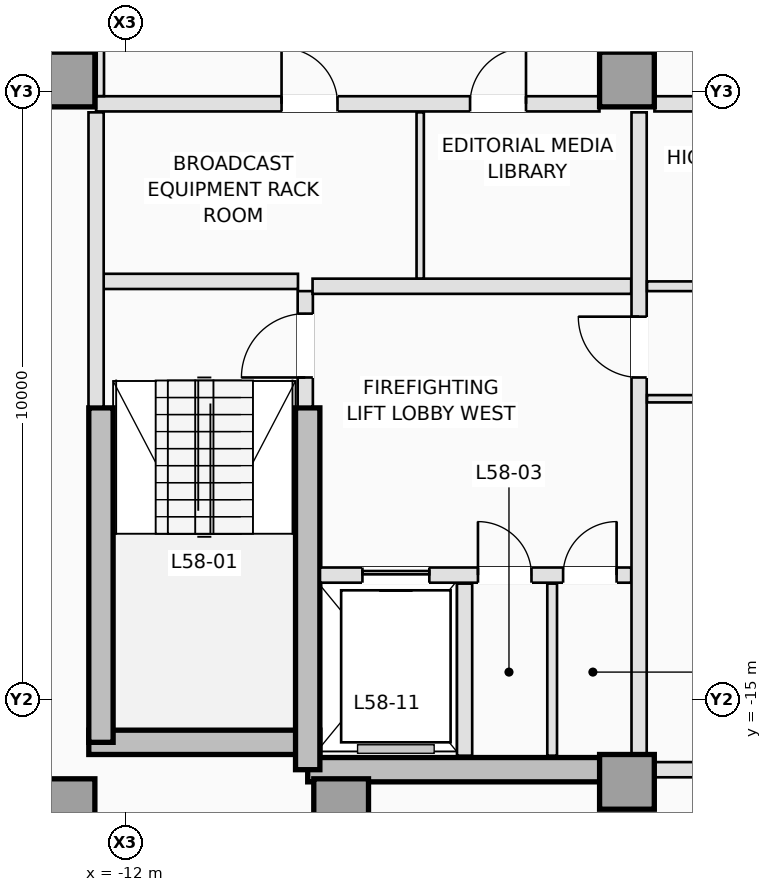
"""IFC4 building model, lengths in metres.
Left out: names, types, materials, properties, quantities, classifications, styles, units other than length and angle.
Written with IfcOpenShell. Run it as: python <this file> out.ifc"""

import sys

from ifc_helpers import new_model, si_unit, direction, frame, frame_2d, origin, origin_2d, place, context, subcontext, project, spatial, rectangle, extrude, element, fill, save


model = new_model("IFC4")
c1 = context("Model", 3, precision=1e-05, world=origin(), true_north=direction((0.0, 1.0)))
c2 = subcontext(c1, "Body", "Model", "MODEL_VIEW")
j1 = project(units=[si_unit("LENGTHUNIT", "METRE"), si_unit("PLANEANGLEUNIT", "RADIAN")], contexts=[c1])
p1 = place(None, origin())
s1 = spatial("IfcSite", under=j1, at=p1, CompositionType="ELEMENT")
p2 = place(p1, origin())
s2 = spatial("IfcBuilding", under=s1, at=p2, CompositionType="ELEMENT")
p3 = place(p2, frame((0.0, 0.0, 211.4)))
s3 = spatial("IfcBuildingStorey", under=s2, at=p3, CompositionType="ELEMENT", Elevation=211.4)
p4 = place(p3, frame((-12.6, -15.7, 0.0), z_axis=(0.0, 0.0, 1.0), x_axis=(1.0, 0.0, 0.0)))
e1 = element("IfcWall", 1, at=p4, inside=s3, PredefinedType="SHEAR", context=c2, shape_type="SweptSolid", body=[
    extrude(rectangle(XDim=3.8, YDim=0.4, at=frame_2d((1.9, 0.0))), origin(), (0.0, 0.0, 1.0), 3.5),
])
p5 = place(p3, frame((-9.0, -16.15, 0.0), z_axis=(0.0, 0.0, 1.0), x_axis=(1.0, 0.0, 0.0)))
e2 = element("IfcWall", 2, at=p5, inside=s3, PredefinedType="SHEAR", context=c2, shape_type="SweptSolid", body=[
    extrude(rectangle(XDim=5.25, YDim=0.4, at=frame_2d((2.625, 0.0))), origin(), (0.0, 0.0, 1.0), 3.5),
])
p6 = place(p3, frame((-12.4, -15.7, 0.0), z_axis=(0.0, 0.0, 1.0), x_axis=(0.0, 1.0, 0.0)))
e3 = element("IfcWall", 3, at=p6, inside=s3, PredefinedType="SHEAR", context=c2, shape_type="SweptSolid", body=[
    extrude(rectangle(XDim=5.5, YDim=0.4, at=frame_2d((2.75, 0.0))), origin(), (0.0, 0.0, 1.0), 3.5),
])
p7 = place(p3, frame((-9.0, -16.15, 0.0), z_axis=(0.0, 0.0, 1.0), x_axis=(0.0, 1.0, 0.0)))
e4 = element("IfcWall", 4, at=p7, inside=s3, PredefinedType="SHEAR", context=c2, shape_type="SweptSolid", body=[
    extrude(rectangle(XDim=5.95, YDim=0.4, at=frame_2d((2.975, 0.0))), origin(), (0.0, 0.0, 1.0), 3.5),
])
for number, where, z_axis, x_axis in (
    (5, (-12.95, -16.75, 0.0), (0.0, 0.0, 1.0), (1.0, 0.0, 0.0)),
    (6, (-8.45, -16.75, 0.0), (0.0, 0.0, 1.0), (1.0, 0.0, 0.0)),
    (7, (-3.75, -16.35, 0.0), (0.0, 0.0, 1.0), (1.0, 0.0, 0.0)),
    (8, (-12.95, -4.8, 0.0), (0.0, 0.0, 1.0), (1.0, 0.0, 0.0)),
    (9, (-3.75, -4.8, 0.0), (0.0, 0.0, 1.0), (1.0, 0.0, 0.0)),
):
    element("IfcColumn", number, at=place(p3, frame(where, z_axis=z_axis, x_axis=x_axis)), inside=s3, PredefinedType="COLUMN", context=c2, shape_type="SweptSolid", body=[
        extrude(rectangle(XDim=0.9, YDim=0.9, at=origin_2d()), origin(), (0.0, 0.0, 1.0), 3.5),
    ])
p8 = place(p3, frame((-9.04, -10.18, 0.0), z_axis=(0.0, 0.0, 1.0), x_axis=(0.0, 1.0, 0.0)))
e10 = element("IfcWall", 10, at=p8, inside=s3, PredefinedType="PARTITIONING", context=c2, shape_type="SweptSolid", body=[
    extrude(rectangle(XDim=1.9, YDim=0.25, at=frame_2d((0.95, 0.0))), origin(), (0.0, 0.0, 1.0), 3.25),
])
p9 = place(p8, frame((0.48, 0.0, 0.0)))
e11 = element("IfcOpeningElement", 11, at=p9, cuts=e10, PredefinedType="OPENING", context=c2, shape_type="SweptSolid", body=[
    extrude(rectangle(XDim=1.05, YDim=2.15, at=frame_2d((0.525, 1.075))), frame((0.0, 0.135, 0.0), z_axis=(0.0, -1.0, 0.0), x_axis=(1.0, 0.0, 0.0)), (0.0, 0.0, 1.0), 0.27),
])
p10 = place(p3, frame((-12.38, -8.12, 0.0), z_axis=(0.0, 0.0, 1.0), x_axis=(1.0, 0.0, 0.0)))
e12 = element("IfcWall", 12, at=p10, inside=s3, PredefinedType="PARTITIONING", context=c2, shape_type="SweptSolid", body=[
    extrude(rectangle(XDim=3.22, YDim=0.25, at=frame_2d((1.61, 0.0))), origin(), (0.0, 0.0, 1.0), 3.25),
])
p11 = place(p3, frame((-12.48, -10.18, 0.0), z_axis=(0.0, 0.0, 1.0), x_axis=(0.0, 1.0, 0.0)))
e13 = element("IfcWall", 13, at=p11, inside=s3, PredefinedType="PARTITIONING", context=c2, shape_type="SweptSolid", body=[
    extrude(rectangle(XDim=4.84, YDim=0.25, at=frame_2d((2.42, 0.0))), origin(), (0.0, 0.0, 1.0), 3.25),
])
p12 = place(p3, frame((-8.798, -12.95, 0.0), z_axis=(0.0, 0.0, 1.0), x_axis=(1.0, 0.0, 0.0)))
e14 = element("IfcWall", 14, at=p12, inside=s3, PredefinedType="PARTITIONING", context=c2, shape_type="SweptSolid", body=[
    extrude(rectangle(XDim=5.118, YDim=0.25, at=frame_2d((2.559, 0.0))), origin(), (0.0, 0.0, 1.0), 3.25),
])
p13 = place(p12, frame((0.698, 0.0, 0.0)))
e15 = element("IfcOpeningElement", 15, at=p13, cuts=e14, PredefinedType="OPENING", context=c2, shape_type="SweptSolid", body=[
    extrude(rectangle(XDim=1.1, YDim=2.15, at=frame_2d((0.55, 1.075))), frame((0.0, 0.135, 0.0), z_axis=(0.0, -1.0, 0.0), x_axis=(1.0, 0.0, 0.0)), (0.0, 0.0, 1.0), 0.27),
])
p14 = place(p12, frame((2.598, 0.0, 0.0)))
e16 = element("IfcOpeningElement", 16, at=p14, cuts=e14, PredefinedType="OPENING", context=c2, shape_type="SweptSolid", body=[
    extrude(rectangle(XDim=0.88, YDim=2.1, at=frame_2d((0.44, 1.05))), frame((0.0, 0.135, 0.0), z_axis=(0.0, -1.0, 0.0), x_axis=(1.0, 0.0, 0.0)), (0.0, 0.0, 1.0), 0.27),
])
p15 = place(p12, frame((3.998, 0.0, 0.0)))
e17 = element("IfcOpeningElement", 17, at=p15, cuts=e14, PredefinedType="OPENING", context=c2, shape_type="SweptSolid", body=[
    extrude(rectangle(XDim=0.88, YDim=2.1, at=frame_2d((0.44, 1.05))), frame((0.0, 0.135, 0.0), z_axis=(0.0, -1.0, 0.0), x_axis=(1.0, 0.0, 0.0)), (0.0, 0.0, 1.0), 0.27),
])
p16 = place(p3, frame((-6.42, -15.92, 0.0), z_axis=(0.0, 0.0, 1.0), x_axis=(0.0, 1.0, 0.0)))
e18 = element("IfcWall", 18, at=p16, inside=s3, PredefinedType="PARTITIONING", context=c2, shape_type="SweptSolid", body=[
    extrude(rectangle(XDim=2.83, YDim=0.25, at=frame_2d((1.415, 0.0))), origin(), (0.0, 0.0, 1.0), 3.25),
])
p17 = place(p3, frame((-4.98, -15.92, 0.0), z_axis=(0.0, 0.0, 1.0), x_axis=(0.0, 1.0, 0.0)))
e19 = element("IfcWall", 19, at=p17, inside=s3, PredefinedType="PARTITIONING", context=c2, shape_type="SweptSolid", body=[
    extrude(rectangle(XDim=2.83, YDim=0.16, at=frame_2d((1.415, 0.0))), origin(), (0.0, 0.0, 1.0), 3.25),
])
p18 = place(p3, frame((-8.92, -8.2, 0.0), z_axis=(0.0, 0.0, 1.0), x_axis=(1.0, 0.0, 0.0)))
e20 = element("IfcWall", 20, at=p18, inside=s3, PredefinedType="PARTITIONING", context=c2, shape_type="SweptSolid", body=[
    extrude(rectangle(XDim=5.24, YDim=0.25, at=frame_2d((2.62, 0.0))), origin(), (0.0, 0.0, 1.0), 3.25),
])
p19 = place(p3, frame((-3.55, -15.898, 0.0), z_axis=(0.0, 0.0, 1.0), x_axis=(0.0, 1.0, 0.0)))
e21 = element("IfcWall", 21, at=p19, inside=s3, PredefinedType="PARTITIONING", context=c2, shape_type="SweptSolid", body=[
    extrude(rectangle(XDim=10.558, YDim=0.25, at=frame_2d((5.279, 0.0))), origin(), (0.0, 0.0, 1.0), 3.25),
])
p20 = place(p19, frame((6.198, 0.0, 0.0)))
e22 = element("IfcOpeningElement", 22, at=p20, cuts=e21, PredefinedType="OPENING", context=c2, shape_type="SweptSolid", body=[
    extrude(rectangle(XDim=1.0, YDim=2.15, at=frame_2d((0.5, 1.075))), frame((0.0, 0.135, 0.0), z_axis=(0.0, -1.0, 0.0), x_axis=(1.0, 0.0, 0.0)), (0.0, 0.0, 1.0), 0.27),
])
p21 = place(p3, frame((-12.48, -5.2, 0.0), z_axis=(0.0, 0.0, 1.0), x_axis=(1.0, 0.0, 0.0)))
e23 = element("IfcWall", 23, at=p21, inside=s3, PredefinedType="PARTITIONING", context=c2, shape_type="SweptSolid", body=[
    extrude(rectangle(XDim=8.278, YDim=0.25, at=frame_2d((4.139, 0.0))), origin(), (0.0, 0.0, 1.0), 3.25),
])
p22 = place(p21, frame((3.05, 0.0, 0.0)))
e24 = element("IfcOpeningElement", 24, at=p22, cuts=e23, PredefinedType="OPENING", context=c2, shape_type="SweptSolid", body=[
    extrude(rectangle(XDim=0.92, YDim=2.12, at=frame_2d((0.46, 1.06))), frame((0.0, 0.135, 0.0), z_axis=(0.0, -1.0, 0.0), x_axis=(1.0, 0.0, 0.0)), (0.0, 0.0, 1.0), 0.27),
])
p23 = place(p21, frame((6.15, 0.0, 0.0)))
e25 = element("IfcOpeningElement", 25, at=p23, cuts=e23, PredefinedType="OPENING", context=c2, shape_type="SweptSolid", body=[
    extrude(rectangle(XDim=0.92, YDim=2.12, at=frame_2d((0.46, 1.06))), frame((0.0, 0.135, 0.0), z_axis=(0.0, -1.0, 0.0), x_axis=(1.0, 0.0, 0.0)), (0.0, 0.0, 1.0), 0.27),
])
p24 = place(p3, frame((-3.298, -5.2, 0.0), z_axis=(0.0, 0.0, 1.0), x_axis=(1.0, 0.0, 0.0)))
e26 = element("IfcWall", 26, at=p24, inside=s3, PredefinedType="PARTITIONING", context=c2, shape_type="SweptSolid", body=[
    extrude(rectangle(XDim=2.348, YDim=0.25, at=frame_2d((1.174, 0.0))), origin(), (0.0, 0.0, 1.0), 3.25),
])
p25 = place(p3, frame((-7.15, -8.073, 0.0), z_axis=(0.0, 0.0, 1.0), x_axis=(0.0, 1.0, 0.0)))
e27 = element("IfcWall", 27, at=p25, inside=s3, PredefinedType="PARTITIONING", context=c2, shape_type="SweptSolid", body=[
    extrude(rectangle(XDim=2.733, YDim=0.12, at=frame_2d((1.366, 0.0))), origin(), (0.0, 0.0, 1.0), 3.25),
])
p26 = place(p3, frame((-3.298, -16.15, 0.0), z_axis=(0.0, 0.0, 1.0), x_axis=(1.0, 0.0, 0.0)))
e28 = element("IfcWall", 28, at=p26, inside=s3, PredefinedType="PARTITIONING", context=c2, shape_type="SweptSolid", body=[
    extrude(rectangle(XDim=6.596, YDim=0.25, at=frame_2d((3.298, 0.0))), origin(), (0.0, 0.0, 1.0), 2.45),
])
p27 = place(p3, frame((-3.42, -8.2, 0.0), z_axis=(0.0, 0.0, 1.0), x_axis=(1.0, 0.0, 0.0)))
e29 = element("IfcWall", 29, at=p27, inside=s3, PredefinedType="PARTITIONING", context=c2, shape_type="SweptSolid", body=[
    extrude(rectangle(XDim=6.84, YDim=0.16, at=frame_2d((3.42, 0.0))), origin(), (0.0, 0.0, 1.0), 3.25),
])
p28 = place(p27, frame((2.92, 0.0, 0.0)))
e30 = element("IfcOpeningElement", 30, at=p28, cuts=e29, PredefinedType="OPENING", context=c2, shape_type="SweptSolid", body=[
    extrude(rectangle(XDim=1.0, YDim=2.15, at=frame_2d((0.5, 1.075))), frame((0.0, 0.09, 0.0), z_axis=(0.0, -1.0, 0.0), x_axis=(1.0, 0.0, 0.0)), (0.0, 0.0, 1.0), 0.18),
])
p29 = place(p3, frame((-3.42, -10.05, 0.0), z_axis=(0.0, 0.0, 1.0), x_axis=(1.0, 0.0, 0.0)))
e31 = element("IfcWall", 31, at=p29, inside=s3, PredefinedType="PARTITIONING", context=c2, shape_type="SweptSolid", body=[
    extrude(rectangle(XDim=6.84, YDim=0.12, at=frame_2d((3.42, 0.0))), origin(), (0.0, 0.0, 1.0), 3.25),
])
p30 = place(p29, frame((1.85, 0.0, 0.0)))
e32 = element("IfcOpeningElement", 32, at=p30, cuts=e31, PredefinedType="OPENING", context=c2, shape_type="SweptSolid", body=[
    extrude(rectangle(XDim=0.92, YDim=2.12, at=frame_2d((0.46, 1.06))), frame((0.0, 0.07, 0.0), z_axis=(0.0, -1.0, 0.0), x_axis=(1.0, 0.0, 0.0)), (0.0, 0.0, 1.0), 0.14),
])
p31 = place(p29, frame((5.35, 0.0, 0.0)))
e33 = element("IfcOpeningElement", 33, at=p31, cuts=e31, PredefinedType="OPENING", context=c2, shape_type="SweptSolid", body=[
    extrude(rectangle(XDim=0.88, YDim=2.12, at=frame_2d((0.44, 1.06))), frame((0.0, 0.07, 0.0), z_axis=(0.0, -1.0, 0.0), x_axis=(1.0, 0.0, 0.0)), (0.0, 0.0, 1.0), 0.14),
])
p32 = place(p3, frame((-12.41, -5.073, 0.0), z_axis=(0.0, 0.0, 1.0), x_axis=(0.0, 1.0, 0.0)))
e34 = element("IfcWall", 34, at=p32, inside=s3, PredefinedType="PARTITIONING", context=c2, shape_type="SweptSolid", body=[
    extrude(rectangle(XDim=2.673, YDim=0.12, at=frame_2d((1.336, 0.0))), origin(), (0.0, 0.0, 1.0), 3.25),
])
p33 = place(p13, origin())
e35 = element("IfcDoor", 35, at=p33, inside=s3, OperationType="SLIDING_TO_LEFT", PredefinedType="DOOR", context=c2, shape_type="SweptSolid", body=[
    extrude(rectangle(XDim=1.1, YDim=2.15, at=frame_2d((0.55, 1.075))), frame((0.0, 0.025, 0.0), z_axis=(0.0, -1.0, 0.0), x_axis=(1.0, 0.0, 0.0)), (0.0, 0.0, 1.0), 0.05),
])
fill(e15, e35)
p34 = place(p9, origin())
e36 = element("IfcDoor", 36, at=p34, inside=s3, OperationType="SINGLE_SWING_LEFT", PredefinedType="DOOR", context=c2, shape_type="SweptSolid", body=[
    extrude(rectangle(XDim=1.05, YDim=2.15, at=frame_2d((0.525, 1.075))), frame((0.0, 0.025, 0.0), z_axis=(0.0, -1.0, 0.0), x_axis=(1.0, 0.0, 0.0)), (0.0, 0.0, 1.0), 0.05),
])
fill(e11, e36)
p35 = place(p14, origin())
e37 = element("IfcDoor", 37, at=p35, inside=s3, OperationType="SINGLE_SWING_LEFT", PredefinedType="TRAPDOOR", context=c2, shape_type="SweptSolid", body=[
    extrude(rectangle(XDim=0.88, YDim=2.1, at=frame_2d((0.44, 1.05))), frame((0.0, 0.025, 0.0), z_axis=(0.0, -1.0, 0.0), x_axis=(1.0, 0.0, 0.0)), (0.0, 0.0, 1.0), 0.05),
])
fill(e16, e37)
p36 = place(p15, origin())
e38 = element("IfcDoor", 38, at=p36, inside=s3, OperationType="SINGLE_SWING_RIGHT", PredefinedType="TRAPDOOR", context=c2, shape_type="SweptSolid", body=[
    extrude(rectangle(XDim=0.88, YDim=2.1, at=frame_2d((0.44, 1.05))), frame((0.0, 0.025, 0.0), z_axis=(0.0, -1.0, 0.0), x_axis=(1.0, 0.0, 0.0)), (0.0, 0.0, 1.0), 0.05),
])
fill(e17, e38)
p37 = place(p20, origin())
e39 = element("IfcDoor", 39, at=p37, inside=s3, OperationType="SINGLE_SWING_RIGHT", PredefinedType="DOOR", context=c2, shape_type="SweptSolid", body=[
    extrude(rectangle(XDim=1.0, YDim=2.15, at=frame_2d((0.5, 1.075))), frame((0.0, 0.025, 0.0), z_axis=(0.0, -1.0, 0.0), x_axis=(1.0, 0.0, 0.0)), (0.0, 0.0, 1.0), 0.05),
])
fill(e22, e39)
p38 = place(p22, origin())
e40 = element("IfcDoor", 40, at=p38, inside=s3, OperationType="SINGLE_SWING_LEFT", PredefinedType="DOOR", context=c2, shape_type="SweptSolid", body=[
    extrude(rectangle(XDim=0.92, YDim=2.12, at=frame_2d((0.46, 1.06))), frame((0.0, 0.025, 0.0), z_axis=(0.0, -1.0, 0.0), x_axis=(1.0, 0.0, 0.0)), (0.0, 0.0, 1.0), 0.05),
])
fill(e24, e40)
p39 = place(p23, origin())
e41 = element("IfcDoor", 41, at=p39, inside=s3, OperationType="SINGLE_SWING_RIGHT", PredefinedType="DOOR", context=c2, shape_type="SweptSolid", body=[
    extrude(rectangle(XDim=0.92, YDim=2.12, at=frame_2d((0.46, 1.06))), frame((0.0, 0.025, 0.0), z_axis=(0.0, -1.0, 0.0), x_axis=(1.0, 0.0, 0.0)), (0.0, 0.0, 1.0), 0.05),
])
fill(e25, e41)
save(model, sys.argv[1])
